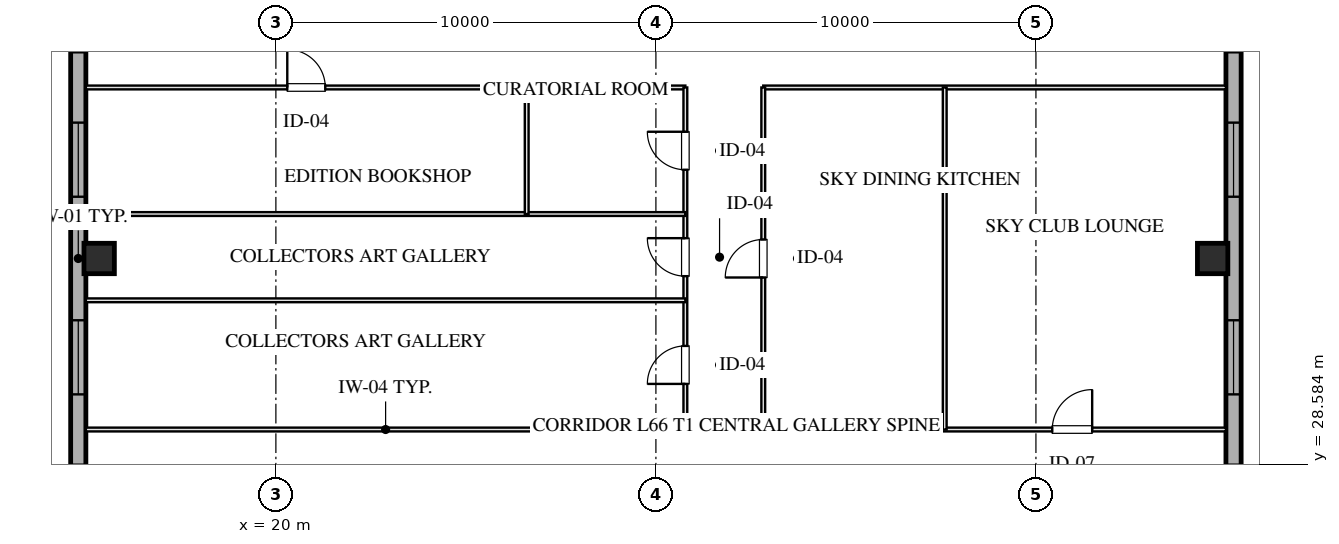
"""IFC4 building model, lengths in metres.
Left out: names, types, materials, properties, quantities, classifications, styles, units other than length and angle.
Written with IfcOpenShell. Run it as: python <this file> out.ifc"""

import sys

from ifc_helpers import new_model, si_unit, direction, frame, frame_2d, origin, origin_2d, place, context, subcontext, project, spatial, rectangle, hollow_rectangle, extrude, element, fill, save


model = new_model("IFC4")
c1 = context("Model", 3, precision=1e-05, world=origin(), true_north=direction((0.0, 1.0)))
c2 = subcontext(c1, "Body", "Model", "MODEL_VIEW")
j1 = project(units=[si_unit("LENGTHUNIT", "METRE"), si_unit("PLANEANGLEUNIT", "RADIAN")], contexts=[c1])
p1 = place(None, origin())
s1 = spatial("IfcSite", under=j1, at=p1, CompositionType="ELEMENT")
p2 = place(p1, origin())
s2 = spatial("IfcBuilding", under=s1, at=p2, CompositionType="ELEMENT")
p3 = place(p2, frame((0.0, 0.0, 244.0)))
s3 = spatial("IfcBuildingStorey", under=s2, at=p3, CompositionType="ELEMENT", Elevation=244.0)
for number, where, z_axis, x_axis in (
    (1, (15.35, 34.0, 0.0), (0.0, 0.0, 1.0), (1.0, 0.0, 0.0)),
    (2, (44.65, 34.0, 0.0), (0.0, 0.0, 1.0), (1.0, 0.0, 0.0)),
):
    element("IfcColumn", number, at=place(p3, frame(where, z_axis=z_axis, x_axis=x_axis)), inside=s3, PredefinedType="COLUMN", context=c2, shape_type="SweptSolid", body=[
        extrude(hollow_rectangle(XDim=0.8, YDim=0.8, WallThickness=0.028, at=origin_2d()), origin(), (0.0, 0.0, 1.0), 3.201),
    ])
p4 = place(p3, frame((14.8, 13.1, 0.0), z_axis=(0.0, 0.0, 1.0), x_axis=(0.0, 1.0, 0.0)))
e3 = element("IfcWall", 3, at=p4, inside=s3, PredefinedType="SOLIDWALL", context=c2, shape_type="SweptSolid", body=[
    extrude(rectangle(XDim=41.8, YDim=0.4, at=frame_2d((20.9, 0.0))), origin(), (0.0, 0.0, 1.0), 2.36),
])
p5 = place(p4, frame((13.525, 0.0, 0.75)))
e4 = element("IfcOpeningElement", 4, at=p5, cuts=e3, PredefinedType="OPENING", context=c2, shape_type="SweptSolid", body=[
    extrude(rectangle(XDim=1.95, YDim=1.21, at=frame_2d((0.975, 0.605))), frame((0.0, 0.21, 0.0), z_axis=(0.0, -1.0, 0.0), x_axis=(1.0, 0.0, 0.0)), (0.0, 0.0, 1.0), 0.42),
])
p6 = place(p4, frame((17.325, 0.0, 0.75)))
e5 = element("IfcOpeningElement", 5, at=p6, cuts=e3, PredefinedType="OPENING", context=c2, shape_type="SweptSolid", body=[
    extrude(rectangle(XDim=1.95, YDim=1.21, at=frame_2d((0.975, 0.605))), frame((0.0, 0.21, 0.0), z_axis=(0.0, -1.0, 0.0), x_axis=(1.0, 0.0, 0.0)), (0.0, 0.0, 1.0), 0.42),
])
p7 = place(p4, frame((22.525, 0.0, 0.75)))
e6 = element("IfcOpeningElement", 6, at=p7, cuts=e3, PredefinedType="OPENING", context=c2, shape_type="SweptSolid", body=[
    extrude(rectangle(XDim=1.95, YDim=1.21, at=frame_2d((0.975, 0.605))), frame((0.0, 0.21, 0.0), z_axis=(0.0, -1.0, 0.0), x_axis=(1.0, 0.0, 0.0)), (0.0, 0.0, 1.0), 0.42),
])
p8 = place(p4, frame((26.325, 0.0, 0.75)))
e7 = element("IfcOpeningElement", 7, at=p8, cuts=e3, PredefinedType="OPENING", context=c2, shape_type="SweptSolid", body=[
    extrude(rectangle(XDim=1.95, YDim=1.21, at=frame_2d((0.975, 0.605))), frame((0.0, 0.21, 0.0), z_axis=(0.0, -1.0, 0.0), x_axis=(1.0, 0.0, 0.0)), (0.0, 0.0, 1.0), 0.42),
])
p9 = place(p3, frame((45.2, 54.9, 0.0), z_axis=(0.0, 0.0, 1.0), x_axis=(0.0, -1.0, 0.0)))
e8 = element("IfcWall", 8, at=p9, inside=s3, PredefinedType="SOLIDWALL", context=c2, shape_type="SweptSolid", body=[
    extrude(rectangle(XDim=41.8, YDim=0.4, at=frame_2d((20.9, 0.0))), origin(), (0.0, 0.0, 1.0), 2.36),
])
p10 = place(p9, frame((26.325, 0.0, 0.75)))
e9 = element("IfcOpeningElement", 9, at=p10, cuts=e8, PredefinedType="OPENING", context=c2, shape_type="SweptSolid", body=[
    extrude(rectangle(XDim=1.95, YDim=1.21, at=frame_2d((0.975, 0.605))), frame((0.0, 0.21, 0.0), z_axis=(0.0, -1.0, 0.0), x_axis=(1.0, 0.0, 0.0)), (0.0, 0.0, 1.0), 0.42),
])
p11 = place(p9, frame((22.525, 0.0, 0.75)))
e10 = element("IfcOpeningElement", 10, at=p11, cuts=e8, PredefinedType="OPENING", context=c2, shape_type="SweptSolid", body=[
    extrude(rectangle(XDim=1.95, YDim=1.21, at=frame_2d((0.975, 0.605))), frame((0.0, 0.21, 0.0), z_axis=(0.0, -1.0, 0.0), x_axis=(1.0, 0.0, 0.0)), (0.0, 0.0, 1.0), 0.42),
])
p12 = place(p9, frame((17.325, 0.0, 0.75)))
e11 = element("IfcOpeningElement", 11, at=p12, cuts=e8, PredefinedType="OPENING", context=c2, shape_type="SweptSolid", body=[
    extrude(rectangle(XDim=1.95, YDim=1.21, at=frame_2d((0.975, 0.605))), frame((0.0, 0.21, 0.0), z_axis=(0.0, -1.0, 0.0), x_axis=(1.0, 0.0, 0.0)), (0.0, 0.0, 1.0), 0.42),
])
p13 = place(p9, frame((13.525, 0.0, 0.75)))
e12 = element("IfcOpeningElement", 12, at=p13, cuts=e8, PredefinedType="OPENING", context=c2, shape_type="SweptSolid", body=[
    extrude(rectangle(XDim=1.95, YDim=1.21, at=frame_2d((0.975, 0.605))), frame((0.0, 0.21, 0.0), z_axis=(0.0, -1.0, 0.0), x_axis=(1.0, 0.0, 0.0)), (0.0, 0.0, 1.0), 0.42),
])
p14 = place(p3, frame((15.0, 29.5, 0.0), z_axis=(0.0, 0.0, 1.0), x_axis=(1.0, 0.0, 0.0)))
e13 = element("IfcWall", 13, at=p14, inside=s3, PredefinedType="MOVABLE", context=c2, shape_type="SweptSolid", body=[
    extrude(rectangle(XDim=15.775, YDim=0.1, at=frame_2d((7.887, 0.0))), origin(), (0.0, 0.0, 1.0), 2.925),
])
p15 = place(p3, frame((32.825, 29.5, 0.0), z_axis=(0.0, 0.0, 1.0), x_axis=(1.0, 0.0, 0.0)))
e14 = element("IfcWall", 14, at=p15, inside=s3, PredefinedType="MOVABLE", context=c2, shape_type="SweptSolid", body=[
    extrude(rectangle(XDim=12.175, YDim=0.1, at=frame_2d((6.087, 0.0))), origin(), (0.0, 0.0, 1.0), 2.925),
])
p16 = place(p15, frame((7.605, 0.0, 0.0)))
e15 = element("IfcOpeningElement", 15, at=p16, cuts=e14, PredefinedType="OPENING", context=c2, shape_type="SweptSolid", body=[
    extrude(rectangle(XDim=1.05, YDim=2.05, at=frame_2d((0.525, 1.025))), frame((0.0, 0.06, 0.0), z_axis=(0.0, -1.0, 0.0), x_axis=(1.0, 0.0, 0.0)), (0.0, 0.0, 1.0), 0.12),
])
p17 = place(p3, frame((15.0, 38.5, 0.0), z_axis=(0.0, 0.0, 1.0), x_axis=(1.0, 0.0, 0.0)))
e16 = element("IfcWall", 16, at=p17, inside=s3, PredefinedType="MOVABLE", context=c2, shape_type="SweptSolid", body=[
    extrude(rectangle(XDim=15.775, YDim=0.1, at=frame_2d((7.887, 0.0))), origin(), (0.0, 0.0, 1.0), 2.925),
])
p18 = place(p17, frame((5.3, 0.0, 0.0)))
e17 = element("IfcOpeningElement", 17, at=p18, cuts=e16, PredefinedType="OPENING", context=c2, shape_type="SweptSolid", body=[
    extrude(rectangle(XDim=1.0, YDim=2.05, at=frame_2d((0.5, 1.025))), frame((0.0, 0.06, 0.0), z_axis=(0.0, -1.0, 0.0), x_axis=(1.0, 0.0, 0.0)), (0.0, 0.0, 1.0), 0.12),
])
p19 = place(p3, frame((32.825, 38.5, 0.0), z_axis=(0.0, 0.0, 1.0), x_axis=(1.0, 0.0, 0.0)))
e18 = element("IfcWall", 18, at=p19, inside=s3, PredefinedType="MOVABLE", context=c2, shape_type="SweptSolid", body=[
    extrude(rectangle(XDim=12.175, YDim=0.1, at=frame_2d((6.087, 0.0))), origin(), (0.0, 0.0, 1.0), 2.925),
])
p20 = place(p3, frame((30.775, 29.5, 0.0), z_axis=(0.0, 0.0, 1.0), x_axis=(0.0, 1.0, 0.0)))
e19 = element("IfcWall", 19, at=p20, inside=s3, PredefinedType="MOVABLE", context=c2, shape_type="SweptSolid", body=[
    extrude(rectangle(XDim=9.0, YDim=0.1, at=frame_2d((4.5, 0.0))), origin(), (0.0, 0.0, 1.0), 2.925),
])
p21 = place(p20, frame((1.2, 0.0, 0.0)))
e20 = element("IfcOpeningElement", 20, at=p21, cuts=e19, PredefinedType="OPENING", context=c2, shape_type="SweptSolid", body=[
    extrude(rectangle(XDim=1.0, YDim=2.05, at=frame_2d((0.5, 1.025))), frame((0.0, 0.06, 0.0), z_axis=(0.0, -1.0, 0.0), x_axis=(1.0, 0.0, 0.0)), (0.0, 0.0, 1.0), 0.12),
])
p22 = place(p20, frame((4.035, 0.0, 0.0)))
e21 = element("IfcOpeningElement", 21, at=p22, cuts=e19, PredefinedType="OPENING", context=c2, shape_type="SweptSolid", body=[
    extrude(rectangle(XDim=1.0, YDim=2.05, at=frame_2d((0.5, 1.025))), frame((0.0, 0.06, 0.0), z_axis=(0.0, -1.0, 0.0), x_axis=(1.0, 0.0, 0.0)), (0.0, 0.0, 1.0), 0.12),
])
p23 = place(p20, frame((6.835, 0.0, 0.0)))
e22 = element("IfcOpeningElement", 22, at=p23, cuts=e19, PredefinedType="OPENING", context=c2, shape_type="SweptSolid", body=[
    extrude(rectangle(XDim=1.0, YDim=2.05, at=frame_2d((0.5, 1.025))), frame((0.0, 0.06, 0.0), z_axis=(0.0, -1.0, 0.0), x_axis=(1.0, 0.0, 0.0)), (0.0, 0.0, 1.0), 0.12),
])
p24 = place(p3, frame((32.825, 29.5, 0.0), z_axis=(0.0, 0.0, 1.0), x_axis=(0.0, 1.0, 0.0)))
e23 = element("IfcWall", 23, at=p24, inside=s3, PredefinedType="MOVABLE", context=c2, shape_type="SweptSolid", body=[
    extrude(rectangle(XDim=9.0, YDim=0.1, at=frame_2d((4.5, 0.0))), origin(), (0.0, 0.0, 1.0), 2.925),
])
p25 = place(p24, frame((4.0, 0.0, 0.0)))
e24 = element("IfcOpeningElement", 24, at=p25, cuts=e23, PredefinedType="OPENING", context=c2, shape_type="SweptSolid", body=[
    extrude(rectangle(XDim=1.0, YDim=2.05, at=frame_2d((0.5, 1.025))), frame((0.0, 0.06, 0.0), z_axis=(0.0, -1.0, 0.0), x_axis=(1.0, 0.0, 0.0)), (0.0, 0.0, 1.0), 0.12),
])
for number, where, z_axis, x_axis in (
    (25, (15.0, 32.9, 0.0), (0.0, 0.0, 1.0), (1.0, 0.0, 0.0)),
    (26, (15.0, 35.17, 0.0), (0.0, 0.0, 1.0), (1.0, 0.0, 0.0)),
):
    element("IfcWall", number, at=place(p3, frame(where, z_axis=z_axis, x_axis=x_axis)), inside=s3, PredefinedType="MOVABLE", context=c2, shape_type="SweptSolid", body=[
        extrude(rectangle(XDim=15.775, YDim=0.1, at=frame_2d((7.887, 0.0))), origin(), (0.0, 0.0, 1.0), 2.925),
    ])
p26 = place(p3, frame((26.6, 35.17, 0.0), z_axis=(0.0, 0.0, 1.0), x_axis=(0.0, 1.0, 0.0)))
e27 = element("IfcWall", 27, at=p26, inside=s3, PredefinedType="MOVABLE", context=c2, shape_type="SweptSolid", body=[
    extrude(rectangle(XDim=3.33, YDim=0.1, at=frame_2d((1.665, 0.0))), origin(), (0.0, 0.0, 1.0), 2.925),
])
p27 = place(p3, frame((37.6, 29.5, 0.0), z_axis=(0.0, 0.0, 1.0), x_axis=(0.0, 1.0, 0.0)))
e28 = element("IfcWall", 28, at=p27, inside=s3, PredefinedType="MOVABLE", context=c2, shape_type="SweptSolid", body=[
    extrude(rectangle(XDim=9.0, YDim=0.1, at=frame_2d((4.5, 0.0))), origin(), (0.0, 0.0, 1.0), 2.925),
])
p28 = place(p6, origin())
e29 = element("IfcWindow", 29, at=p28, inside=s3, PartitioningType="TRIPLE_PANEL_VERTICAL", PredefinedType="WINDOW", context=c2, shape_type="SweptSolid", body=[
    extrude(rectangle(XDim=1.95, YDim=1.21, at=frame_2d((0.975, 0.605))), frame((0.0, 0.03, 0.0), z_axis=(0.0, -1.0, 0.0), x_axis=(1.0, 0.0, 0.0)), (0.0, 0.0, 1.0), 0.06),
])
fill(e5, e29)
p29 = place(p7, origin())
e30 = element("IfcWindow", 30, at=p29, inside=s3, PartitioningType="TRIPLE_PANEL_VERTICAL", PredefinedType="WINDOW", context=c2, shape_type="SweptSolid", body=[
    extrude(rectangle(XDim=1.95, YDim=1.21, at=frame_2d((0.975, 0.605))), frame((0.0, 0.03, 0.0), z_axis=(0.0, -1.0, 0.0), x_axis=(1.0, 0.0, 0.0)), (0.0, 0.0, 1.0), 0.06),
])
fill(e6, e30)
p30 = place(p11, origin())
e31 = element("IfcWindow", 31, at=p30, inside=s3, PartitioningType="TRIPLE_PANEL_VERTICAL", PredefinedType="WINDOW", context=c2, shape_type="SweptSolid", body=[
    extrude(rectangle(XDim=1.95, YDim=1.21, at=frame_2d((0.975, 0.605))), frame((0.0, 0.03, 0.0), z_axis=(0.0, -1.0, 0.0), x_axis=(1.0, 0.0, 0.0)), (0.0, 0.0, 1.0), 0.06),
])
fill(e10, e31)
p31 = place(p12, origin())
e32 = element("IfcWindow", 32, at=p31, inside=s3, PartitioningType="TRIPLE_PANEL_VERTICAL", PredefinedType="WINDOW", context=c2, shape_type="SweptSolid", body=[
    extrude(rectangle(XDim=1.95, YDim=1.21, at=frame_2d((0.975, 0.605))), frame((0.0, 0.03, 0.0), z_axis=(0.0, -1.0, 0.0), x_axis=(1.0, 0.0, 0.0)), (0.0, 0.0, 1.0), 0.06),
])
fill(e11, e32)
p32 = place(p16, origin())
e33 = element("IfcDoor", 33, at=p32, inside=s3, OperationType="SINGLE_SWING_RIGHT", PredefinedType="DOOR", context=c2, shape_type="SweptSolid", body=[
    extrude(rectangle(XDim=1.05, YDim=2.05, at=frame_2d((0.525, 1.025))), frame((0.0, 0.025, 0.0), z_axis=(0.0, -1.0, 0.0), x_axis=(1.0, 0.0, 0.0)), (0.0, 0.0, 1.0), 0.05),
])
fill(e15, e33)
p33 = place(p18, origin())
e34 = element("IfcDoor", 34, at=p33, inside=s3, OperationType="SINGLE_SWING_LEFT", PredefinedType="DOOR", context=c2, shape_type="SweptSolid", body=[
    extrude(rectangle(XDim=1.0, YDim=2.05, at=frame_2d((0.5, 1.025))), frame((0.0, 0.025, 0.0), z_axis=(0.0, -1.0, 0.0), x_axis=(1.0, 0.0, 0.0)), (0.0, 0.0, 1.0), 0.05),
])
fill(e17, e34)
p34 = place(p21, origin())
e35 = element("IfcDoor", 35, at=p34, inside=s3, OperationType="SINGLE_SWING_LEFT", PredefinedType="DOOR", context=c2, shape_type="SweptSolid", body=[
    extrude(rectangle(XDim=1.0, YDim=2.05, at=frame_2d((0.5, 1.025))), frame((0.0, 0.025, 0.0), z_axis=(0.0, -1.0, 0.0), x_axis=(1.0, 0.0, 0.0)), (0.0, 0.0, 1.0), 0.05),
])
fill(e20, e35)
p35 = place(p22, origin())
e36 = element("IfcDoor", 36, at=p35, inside=s3, OperationType="SINGLE_SWING_RIGHT", PredefinedType="DOOR", context=c2, shape_type="SweptSolid", body=[
    extrude(rectangle(XDim=1.0, YDim=2.05, at=frame_2d((0.5, 1.025))), frame((0.0, 0.025, 0.0), z_axis=(0.0, -1.0, 0.0), x_axis=(1.0, 0.0, 0.0)), (0.0, 0.0, 1.0), 0.05),
])
fill(e21, e36)
p36 = place(p23, origin())
e37 = element("IfcDoor", 37, at=p36, inside=s3, OperationType="SINGLE_SWING_RIGHT", PredefinedType="DOOR", context=c2, shape_type="SweptSolid", body=[
    extrude(rectangle(XDim=1.0, YDim=2.05, at=frame_2d((0.5, 1.025))), frame((0.0, 0.025, 0.0), z_axis=(0.0, -1.0, 0.0), x_axis=(1.0, 0.0, 0.0)), (0.0, 0.0, 1.0), 0.05),
])
fill(e22, e37)
p37 = place(p25, origin())
e38 = element("IfcDoor", 38, at=p37, inside=s3, OperationType="SINGLE_SWING_LEFT", PredefinedType="DOOR", context=c2, shape_type="SweptSolid", body=[
    extrude(rectangle(XDim=1.0, YDim=2.05, at=frame_2d((0.5, 1.025))), frame((0.0, 0.025, 0.0), z_axis=(0.0, -1.0, 0.0), x_axis=(1.0, 0.0, 0.0)), (0.0, 0.0, 1.0), 0.05),
])
fill(e24, e38)
save(model, sys.argv[1])
